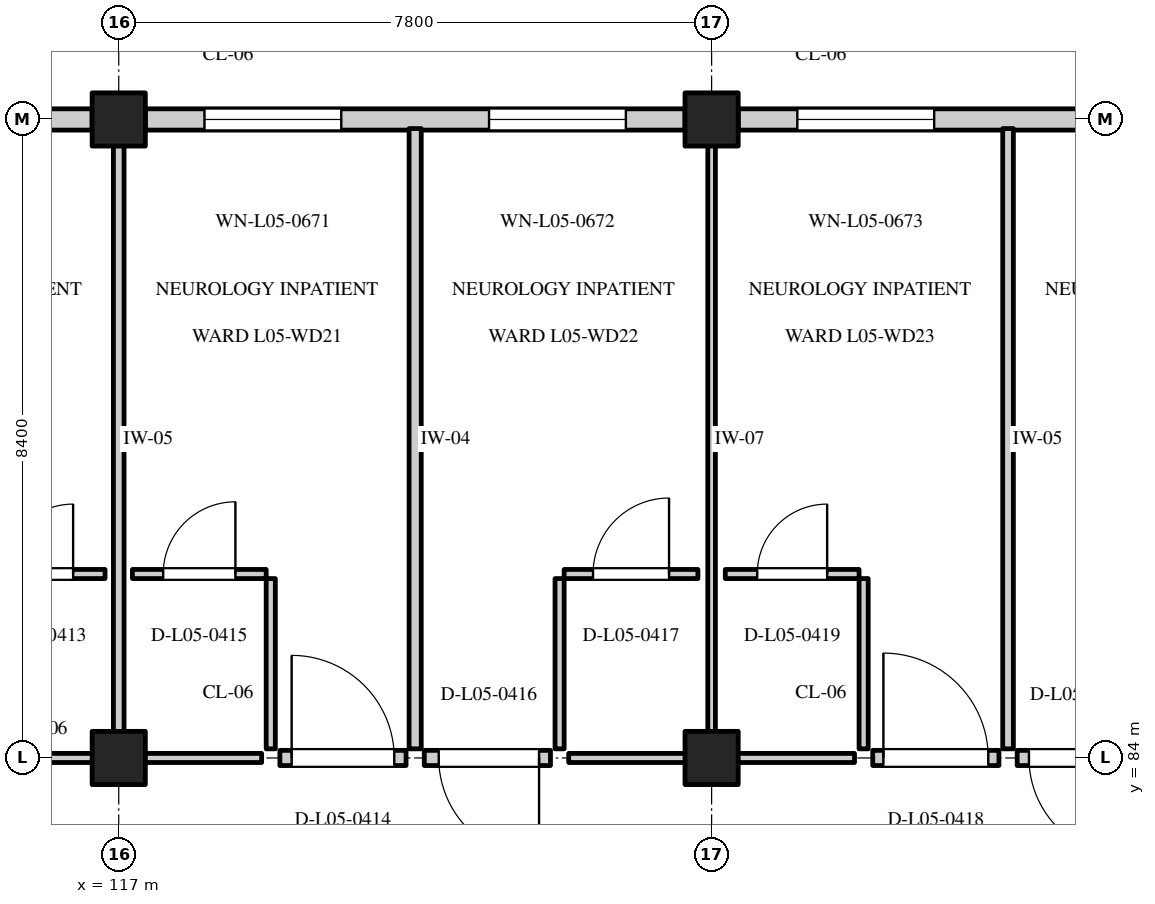
"""IFC4 building model, lengths in metres.
Left out: names, types, materials, properties, quantities, classifications, styles, units other than length and angle.
Written with IfcOpenShell. Run it as: python <this file> out.ifc"""

import sys

from ifc_helpers import new_model, si_unit, direction, frame, frame_2d, origin, origin_2d, place, context, subcontext, project, spatial, rectangle, extrude, element, fill, save


model = new_model("IFC4")
c1 = context("Model", 3, precision=1e-05, world=origin(), true_north=direction((0.0, 1.0)))
c2 = subcontext(c1, "Body", "Model", "MODEL_VIEW")
j1 = project(units=[si_unit("LENGTHUNIT", "METRE"), si_unit("PLANEANGLEUNIT", "RADIAN")], contexts=[c1])
p1 = place(None, origin())
s1 = spatial("IfcSite", under=j1, at=p1, CompositionType="ELEMENT")
p2 = place(p1, origin())
s2 = spatial("IfcBuilding", under=s1, at=p2, CompositionType="ELEMENT")
p3 = place(p2, frame((0.0, 0.0, 22.2)))
s3 = spatial("IfcBuildingStorey", under=s2, at=p3, CompositionType="ELEMENT", Elevation=22.2)
for number, where, z_axis, x_axis in (
    (1, (117.0, 84.0, 0.0), (0.0, 0.0, 1.0), (1.0, 0.0, 0.0)),
    (2, (117.0, 92.4, 0.0), (0.0, 0.0, 1.0), (1.0, 0.0, 0.0)),
    (3, (124.8, 84.0, 0.0), (0.0, 0.0, 1.0), (1.0, 0.0, 0.0)),
    (4, (124.8, 92.4, 0.0), (0.0, 0.0, 1.0), (1.0, 0.0, 0.0)),
):
    element("IfcColumn", number, at=place(p3, frame(where, z_axis=z_axis, x_axis=x_axis)), inside=s3, PredefinedType="COLUMN", context=c2, shape_type="SweptSolid", body=[
        extrude(rectangle(XDim=0.7, YDim=0.7, at=origin_2d()), origin(), (0.0, 0.0, 1.0), 3.9),
    ])
p4 = place(p3, frame((109.55, 92.4, 0.0), z_axis=(0.0, 0.0, 1.0), x_axis=(1.0, 0.0, 0.0)))
e5 = element("IfcWall", 5, at=p4, inside=s3, PredefinedType="STANDARD", context=c2, shape_type="SweptSolid", body=[
    extrude(rectangle(XDim=7.1, YDim=0.28, at=frame_2d((3.55, 0.0))), origin(), (0.0, 0.0, 1.0), 3.05),
])
p5 = place(p4, frame((0.678, 0.0, 0.8)))
e6 = element("IfcOpeningElement", 6, at=p5, cuts=e5, PredefinedType="OPENING", context=c2, shape_type="SweptSolid", body=[
    extrude(rectangle(XDim=2.0, YDim=1.45, at=frame_2d((1.0, 0.725))), frame((0.0, 0.152, 0.0), z_axis=(0.0, -1.0, 0.0), x_axis=(1.0, 0.0, 0.0)), (0.0, 0.0, 1.0), 0.304),
])
p6 = place(p4, frame((4.422, 0.0, 0.8)))
e7 = element("IfcOpeningElement", 7, at=p6, cuts=e5, PredefinedType="OPENING", context=c2, shape_type="SweptSolid", body=[
    extrude(rectangle(XDim=2.0, YDim=1.45, at=frame_2d((1.0, 0.725))), frame((0.0, 0.152, 0.0), z_axis=(0.0, -1.0, 0.0), x_axis=(1.0, 0.0, 0.0)), (0.0, 0.0, 1.0), 0.304),
])
p7 = place(p3, frame((117.35, 92.4, 0.0), z_axis=(0.0, 0.0, 1.0), x_axis=(1.0, 0.0, 0.0)))
e8 = element("IfcWall", 8, at=p7, inside=s3, PredefinedType="STANDARD", context=c2, shape_type="SweptSolid", body=[
    extrude(rectangle(XDim=7.1, YDim=0.28, at=frame_2d((3.55, 0.0))), origin(), (0.0, 0.0, 1.0), 3.05),
])
p8 = place(p7, frame((0.778, 0.0, 0.8)))
e9 = element("IfcOpeningElement", 9, at=p8, cuts=e8, PredefinedType="OPENING", context=c2, shape_type="SweptSolid", body=[
    extrude(rectangle(XDim=1.8, YDim=1.75, at=frame_2d((0.9, 0.875))), frame((0.0, 0.152, 0.0), z_axis=(0.0, -1.0, 0.0), x_axis=(1.0, 0.0, 0.0)), (0.0, 0.0, 1.0), 0.304),
])
p9 = place(p7, frame((4.522, 0.0, 0.8)))
e10 = element("IfcOpeningElement", 10, at=p9, cuts=e8, PredefinedType="OPENING", context=c2, shape_type="SweptSolid", body=[
    extrude(rectangle(XDim=1.8, YDim=1.75, at=frame_2d((0.9, 0.875))), frame((0.0, 0.152, 0.0), z_axis=(0.0, -1.0, 0.0), x_axis=(1.0, 0.0, 0.0)), (0.0, 0.0, 1.0), 0.304),
])
p10 = place(p3, frame((125.15, 92.4, 0.0), z_axis=(0.0, 0.0, 1.0), x_axis=(1.0, 0.0, 0.0)))
e11 = element("IfcWall", 11, at=p10, inside=s3, PredefinedType="STANDARD", context=c2, shape_type="SweptSolid", body=[
    extrude(rectangle(XDim=7.1, YDim=0.28, at=frame_2d((3.55, 0.0))), origin(), (0.0, 0.0, 1.0), 3.05),
])
p11 = place(p10, frame((0.778, 0.0, 0.8)))
e12 = element("IfcOpeningElement", 12, at=p11, cuts=e11, PredefinedType="OPENING", context=c2, shape_type="SweptSolid", body=[
    extrude(rectangle(XDim=1.8, YDim=1.65, at=frame_2d((0.9, 0.825))), frame((0.0, 0.152, 0.0), z_axis=(0.0, -1.0, 0.0), x_axis=(1.0, 0.0, 0.0)), (0.0, 0.0, 1.0), 0.304),
])
p12 = place(p10, frame((4.522, 0.0, 0.8)))
e13 = element("IfcOpeningElement", 13, at=p12, cuts=e11, PredefinedType="OPENING", context=c2, shape_type="SweptSolid", body=[
    extrude(rectangle(XDim=1.8, YDim=1.65, at=frame_2d((0.9, 0.825))), frame((0.0, 0.152, 0.0), z_axis=(0.0, -1.0, 0.0), x_axis=(1.0, 0.0, 0.0)), (0.0, 0.0, 1.0), 0.304),
])
p13 = place(p3, frame((117.0, 84.12, 0.0), z_axis=(0.0, 0.0, 1.0), x_axis=(0.0, 1.0, 0.0)))
e14 = element("IfcWall", 14, at=p13, inside=s3, PredefinedType="PARTITIONING", context=c2, shape_type="SweptSolid", body=[
    extrude(rectangle(XDim=8.16, YDim=0.14, at=frame_2d((4.08, 0.0))), origin(), (0.0, 0.0, 1.0), 2.95),
])
p14 = place(p3, frame((115.12, 84.0, 0.0), z_axis=(0.0, 0.0, 1.0), x_axis=(1.0, 0.0, 0.0)))
e15 = element("IfcWall", 15, at=p14, inside=s3, PredefinedType="PARTITIONING", context=c2, shape_type="SweptSolid", body=[
    extrude(rectangle(XDim=1.76, YDim=0.12, at=frame_2d((0.88, 0.0))), origin(), (0.0, 0.0, 1.0), 2.95),
])
p15 = place(p3, frame((115.06, 86.42, 0.0), z_axis=(0.0, 0.0, 1.0), x_axis=(1.0, 0.0, 0.0)))
e16 = element("IfcWall", 16, at=p15, inside=s3, PredefinedType="PARTITIONING", context=c2, shape_type="SweptSolid", body=[
    extrude(rectangle(XDim=1.76, YDim=0.12, at=frame_2d((0.88, 0.0))), origin(), (0.0, 0.0, 1.0), 3.58),
])
p16 = place(p15, frame((0.42, 0.0, 0.0)))
e17 = element("IfcOpeningElement", 17, at=p16, cuts=e16, PredefinedType="OPENING", context=c2, shape_type="SweptSolid", body=[
    extrude(rectangle(XDim=0.92, YDim=2.08, at=frame_2d((0.46, 1.04))), frame((0.0, 0.072, 0.0), z_axis=(0.0, -1.0, 0.0), x_axis=(1.0, 0.0, 0.0)), (0.0, 0.0, 1.0), 0.144),
])
p17 = place(p3, frame((120.9, 84.12, 0.0), z_axis=(0.0, 0.0, 1.0), x_axis=(0.0, 1.0, 0.0)))
e18 = element("IfcWall", 18, at=p17, inside=s3, PredefinedType="PARTITIONING", context=c2, shape_type="SweptSolid", body=[
    extrude(rectangle(XDim=8.16, YDim=0.16, at=frame_2d((4.08, 0.0))), origin(), (0.0, 0.0, 1.0), 3.58),
])
p18 = place(p3, frame((119.12, 84.0, 0.0), z_axis=(0.0, 0.0, 1.0), x_axis=(1.0, 0.0, 0.0)))
e19 = element("IfcWall", 19, at=p18, inside=s3, PredefinedType="STANDARD", context=c2, shape_type="SweptSolid", body=[
    extrude(rectangle(XDim=1.66, YDim=0.2, at=frame_2d((0.83, 0.0))), origin(), (0.0, 0.0, 1.0), 2.95),
])
p19 = place(p18, frame((0.155, 0.0, 0.0)))
e20 = element("IfcOpeningElement", 20, at=p19, cuts=e19, PredefinedType="OPENING", context=c2, shape_type="SweptSolid", body=[
    extrude(rectangle(XDim=1.35, YDim=2.15, at=frame_2d((0.675, 1.075))), frame((0.0, 0.112, 0.0), z_axis=(0.0, -1.0, 0.0), x_axis=(1.0, 0.0, 0.0)), (0.0, 0.0, 1.0), 0.224),
])
p20 = place(p3, frame((117.12, 84.0, 0.0), z_axis=(0.0, 0.0, 1.0), x_axis=(1.0, 0.0, 0.0)))
e21 = element("IfcWall", 21, at=p20, inside=s3, PredefinedType="PARTITIONING", context=c2, shape_type="SweptSolid", body=[
    extrude(rectangle(XDim=1.76, YDim=0.12, at=frame_2d((0.88, 0.0))), origin(), (0.0, 0.0, 1.0), 2.95),
])
p21 = place(p3, frame((119.0, 84.12, 0.0), z_axis=(0.0, 0.0, 1.0), x_axis=(0.0, 1.0, 0.0)))
e22 = element("IfcWall", 22, at=p21, inside=s3, PredefinedType="PARTITIONING", context=c2, shape_type="SweptSolid", body=[
    extrude(rectangle(XDim=2.24, YDim=0.12, at=frame_2d((1.12, 0.0))), origin(), (0.0, 0.0, 1.0), 3.58),
])
p22 = place(p3, frame((117.18, 86.42, 0.0), z_axis=(0.0, 0.0, 1.0), x_axis=(1.0, 0.0, 0.0)))
e23 = element("IfcWall", 23, at=p22, inside=s3, PredefinedType="PARTITIONING", context=c2, shape_type="SweptSolid", body=[
    extrude(rectangle(XDim=1.76, YDim=0.12, at=frame_2d((0.88, 0.0))), origin(), (0.0, 0.0, 1.0), 3.58),
])
p23 = place(p22, frame((0.405, 0.0, 0.0)))
e24 = element("IfcOpeningElement", 24, at=p23, cuts=e23, PredefinedType="OPENING", context=c2, shape_type="SweptSolid", body=[
    extrude(rectangle(XDim=0.95, YDim=2.1, at=frame_2d((0.475, 1.05))), frame((0.0, 0.072, 0.0), z_axis=(0.0, -1.0, 0.0), x_axis=(1.0, 0.0, 0.0)), (0.0, 0.0, 1.0), 0.144),
])
p24 = place(p3, frame((124.8, 84.12, 0.0), z_axis=(0.0, 0.0, 1.0), x_axis=(0.0, 1.0, 0.0)))
e25 = element("IfcWall", 25, at=p24, inside=s3, PredefinedType="PARTITIONING", context=c2, shape_type="SweptSolid", body=[
    extrude(rectangle(XDim=8.16, YDim=0.1, at=frame_2d((4.08, 0.0))), origin(), (0.0, 0.0, 1.0), 3.58),
])
p25 = place(p3, frame((121.02, 84.0, 0.0), z_axis=(0.0, 0.0, 1.0), x_axis=(1.0, 0.0, 0.0)))
e26 = element("IfcWall", 26, at=p25, inside=s3, PredefinedType="STANDARD", context=c2, shape_type="SweptSolid", body=[
    extrude(rectangle(XDim=1.66, YDim=0.2, at=frame_2d((0.83, 0.0))), origin(), (0.0, 0.0, 1.0), 2.95),
])
p26 = place(p25, frame((0.19, 0.0, 0.0)))
e27 = element("IfcOpeningElement", 27, at=p26, cuts=e26, PredefinedType="OPENING", context=c2, shape_type="SweptSolid", body=[
    extrude(rectangle(XDim=1.32, YDim=2.2, at=frame_2d((0.66, 1.1))), frame((0.0, 0.112, 0.0), z_axis=(0.0, -1.0, 0.0), x_axis=(1.0, 0.0, 0.0)), (0.0, 0.0, 1.0), 0.224),
])
p27 = place(p3, frame((122.92, 84.0, 0.0), z_axis=(0.0, 0.0, 1.0), x_axis=(1.0, 0.0, 0.0)))
e28 = element("IfcWall", 28, at=p27, inside=s3, PredefinedType="PARTITIONING", context=c2, shape_type="SweptSolid", body=[
    extrude(rectangle(XDim=1.76, YDim=0.12, at=frame_2d((0.88, 0.0))), origin(), (0.0, 0.0, 1.0), 2.95),
])
p28 = place(p3, frame((122.8, 84.12, 0.0), z_axis=(0.0, 0.0, 1.0), x_axis=(0.0, 1.0, 0.0)))
e29 = element("IfcWall", 29, at=p28, inside=s3, PredefinedType="PARTITIONING", context=c2, shape_type="SweptSolid", body=[
    extrude(rectangle(XDim=2.24, YDim=0.12, at=frame_2d((1.12, 0.0))), origin(), (0.0, 0.0, 1.0), 3.58),
])
p29 = place(p3, frame((122.86, 86.42, 0.0), z_axis=(0.0, 0.0, 1.0), x_axis=(1.0, 0.0, 0.0)))
e30 = element("IfcWall", 30, at=p29, inside=s3, PredefinedType="PARTITIONING", context=c2, shape_type="SweptSolid", body=[
    extrude(rectangle(XDim=1.76, YDim=0.12, at=frame_2d((0.88, 0.0))), origin(), (0.0, 0.0, 1.0), 3.58),
])
p30 = place(p29, frame((0.38, 0.0, 0.0)))
e31 = element("IfcOpeningElement", 31, at=p30, cuts=e30, PredefinedType="OPENING", context=c2, shape_type="SweptSolid", body=[
    extrude(rectangle(XDim=1.0, YDim=2.1, at=frame_2d((0.5, 1.05))), frame((0.0, 0.072, 0.0), z_axis=(0.0, -1.0, 0.0), x_axis=(1.0, 0.0, 0.0)), (0.0, 0.0, 1.0), 0.144),
])
p31 = place(p3, frame((128.7, 84.12, 0.0), z_axis=(0.0, 0.0, 1.0), x_axis=(0.0, 1.0, 0.0)))
e32 = element("IfcWall", 32, at=p31, inside=s3, PredefinedType="PARTITIONING", context=c2, shape_type="SweptSolid", body=[
    extrude(rectangle(XDim=8.16, YDim=0.14, at=frame_2d((4.08, 0.0))), origin(), (0.0, 0.0, 1.0), 3.58),
])
p32 = place(p3, frame((126.92, 84.0, 0.0), z_axis=(0.0, 0.0, 1.0), x_axis=(1.0, 0.0, 0.0)))
e33 = element("IfcWall", 33, at=p32, inside=s3, PredefinedType="STANDARD", context=c2, shape_type="SweptSolid", body=[
    extrude(rectangle(XDim=1.66, YDim=0.2, at=frame_2d((0.83, 0.0))), origin(), (0.0, 0.0, 1.0), 2.95),
])
p33 = place(p32, frame((0.14, 0.0, 0.0)))
e34 = element("IfcOpeningElement", 34, at=p33, cuts=e33, PredefinedType="OPENING", context=c2, shape_type="SweptSolid", body=[
    extrude(rectangle(XDim=1.38, YDim=2.2, at=frame_2d((0.69, 1.1))), frame((0.0, 0.112, 0.0), z_axis=(0.0, -1.0, 0.0), x_axis=(1.0, 0.0, 0.0)), (0.0, 0.0, 1.0), 0.224),
])
p34 = place(p3, frame((124.92, 84.0, 0.0), z_axis=(0.0, 0.0, 1.0), x_axis=(1.0, 0.0, 0.0)))
e35 = element("IfcWall", 35, at=p34, inside=s3, PredefinedType="PARTITIONING", context=c2, shape_type="SweptSolid", body=[
    extrude(rectangle(XDim=1.76, YDim=0.12, at=frame_2d((0.88, 0.0))), origin(), (0.0, 0.0, 1.0), 2.95),
])
p35 = place(p3, frame((126.8, 84.12, 0.0), z_axis=(0.0, 0.0, 1.0), x_axis=(0.0, 1.0, 0.0)))
e36 = element("IfcWall", 36, at=p35, inside=s3, PredefinedType="PARTITIONING", context=c2, shape_type="SweptSolid", body=[
    extrude(rectangle(XDim=2.24, YDim=0.12, at=frame_2d((1.12, 0.0))), origin(), (0.0, 0.0, 1.0), 3.58),
])
p36 = place(p3, frame((124.98, 86.42, 0.0), z_axis=(0.0, 0.0, 1.0), x_axis=(1.0, 0.0, 0.0)))
e37 = element("IfcWall", 37, at=p36, inside=s3, PredefinedType="PARTITIONING", context=c2, shape_type="SweptSolid", body=[
    extrude(rectangle(XDim=1.76, YDim=0.12, at=frame_2d((0.88, 0.0))), origin(), (0.0, 0.0, 1.0), 3.58),
])
p37 = place(p36, frame((0.42, 0.0, 0.0)))
e38 = element("IfcOpeningElement", 38, at=p37, cuts=e37, PredefinedType="OPENING", context=c2, shape_type="SweptSolid", body=[
    extrude(rectangle(XDim=0.92, YDim=2.08, at=frame_2d((0.46, 1.04))), frame((0.0, 0.072, 0.0), z_axis=(0.0, -1.0, 0.0), x_axis=(1.0, 0.0, 0.0)), (0.0, 0.0, 1.0), 0.144),
])
p38 = place(p3, frame((128.82, 84.0, 0.0), z_axis=(0.0, 0.0, 1.0), x_axis=(1.0, 0.0, 0.0)))
e39 = element("IfcWall", 39, at=p38, inside=s3, PredefinedType="STANDARD", context=c2, shape_type="SweptSolid", body=[
    extrude(rectangle(XDim=1.66, YDim=0.2, at=frame_2d((0.83, 0.0))), origin(), (0.0, 0.0, 1.0), 2.95),
])
p39 = place(p38, frame((0.155, 0.0, 0.0)))
e40 = element("IfcOpeningElement", 40, at=p39, cuts=e39, PredefinedType="OPENING", context=c2, shape_type="SweptSolid", body=[
    extrude(rectangle(XDim=1.3, YDim=2.15, at=frame_2d((0.65, 1.075))), frame((0.0, 0.112, 0.0), z_axis=(0.0, -1.0, 0.0), x_axis=(1.0, 0.0, 0.0)), (0.0, 0.0, 1.0), 0.224),
])
p40 = place(p8, origin())
e41 = element("IfcWindow", 41, at=p40, inside=s3, PartitioningType="DOUBLE_PANEL_VERTICAL", PredefinedType="WINDOW", context=c2, shape_type="SweptSolid", body=[
    extrude(rectangle(XDim=1.8, YDim=1.75, at=frame_2d((0.9, 0.875))), frame((0.0, 0.03, 0.0), z_axis=(0.0, -1.0, 0.0), x_axis=(1.0, 0.0, 0.0)), (0.0, 0.0, 1.0), 0.06),
])
fill(e9, e41)
p41 = place(p9, origin())
e42 = element("IfcWindow", 42, at=p41, inside=s3, PartitioningType="DOUBLE_PANEL_VERTICAL", PredefinedType="WINDOW", context=c2, shape_type="SweptSolid", body=[
    extrude(rectangle(XDim=1.8, YDim=1.75, at=frame_2d((0.9, 0.875))), frame((0.0, 0.03, 0.0), z_axis=(0.0, -1.0, 0.0), x_axis=(1.0, 0.0, 0.0)), (0.0, 0.0, 1.0), 0.06),
])
fill(e10, e42)
p42 = place(p11, origin())
e43 = element("IfcWindow", 43, at=p42, inside=s3, PartitioningType="DOUBLE_PANEL_VERTICAL", PredefinedType="WINDOW", context=c2, shape_type="SweptSolid", body=[
    extrude(rectangle(XDim=1.8, YDim=1.65, at=frame_2d((0.9, 0.825))), frame((0.0, 0.03, 0.0), z_axis=(0.0, -1.0, 0.0), x_axis=(1.0, 0.0, 0.0)), (0.0, 0.0, 1.0), 0.06),
])
fill(e12, e43)
p43 = place(p16, frame((0.92, 0.0, 0.0), z_axis=(0.0, 0.0, 1.0), x_axis=(-1.0, 0.0, 0.0)))
e44 = element("IfcDoor", 44, at=p43, inside=s3, OperationType="SINGLE_SWING_LEFT", PredefinedType="DOOR", context=c2, shape_type="SweptSolid", body=[
    extrude(rectangle(XDim=0.92, YDim=2.08, at=frame_2d((0.46, 1.04))), frame((0.0, 0.025, 0.0), z_axis=(0.0, -1.0, 0.0), x_axis=(1.0, 0.0, 0.0)), (0.0, 0.0, 1.0), 0.05),
])
fill(e17, e44)
p44 = place(p19, origin())
e45 = element("IfcDoor", 45, at=p44, inside=s3, OperationType="SINGLE_SWING_LEFT", PredefinedType="DOOR", context=c2, shape_type="SweptSolid", body=[
    extrude(rectangle(XDim=1.35, YDim=2.15, at=frame_2d((0.675, 1.075))), frame((0.0, 0.025, 0.0), z_axis=(0.0, -1.0, 0.0), x_axis=(1.0, 0.0, 0.0)), (0.0, 0.0, 1.0), 0.05),
])
fill(e20, e45)
p45 = place(p23, frame((0.95, 0.0, 0.0), z_axis=(0.0, 0.0, 1.0), x_axis=(-1.0, 0.0, 0.0)))
e46 = element("IfcDoor", 46, at=p45, inside=s3, OperationType="SINGLE_SWING_LEFT", PredefinedType="DOOR", context=c2, shape_type="SweptSolid", body=[
    extrude(rectangle(XDim=0.95, YDim=2.1, at=frame_2d((0.475, 1.05))), frame((0.0, 0.025, 0.0), z_axis=(0.0, -1.0, 0.0), x_axis=(1.0, 0.0, 0.0)), (0.0, 0.0, 1.0), 0.05),
])
fill(e24, e46)
p46 = place(p26, origin())
e47 = element("IfcDoor", 47, at=p46, inside=s3, OperationType="SINGLE_SWING_RIGHT", PredefinedType="DOOR", context=c2, shape_type="SweptSolid", body=[
    extrude(rectangle(XDim=1.32, YDim=2.2, at=frame_2d((0.66, 1.1))), frame((0.0, 0.025, 0.0), z_axis=(0.0, -1.0, 0.0), x_axis=(1.0, 0.0, 0.0)), (0.0, 0.0, 1.0), 0.05),
])
fill(e27, e47)
p47 = place(p30, frame((1.0, 0.0, 0.0), z_axis=(0.0, 0.0, 1.0), x_axis=(-1.0, 0.0, 0.0)))
e48 = element("IfcDoor", 48, at=p47, inside=s3, OperationType="SINGLE_SWING_LEFT", PredefinedType="DOOR", context=c2, shape_type="SweptSolid", body=[
    extrude(rectangle(XDim=1.0, YDim=2.1, at=frame_2d((0.5, 1.05))), frame((0.0, 0.025, 0.0), z_axis=(0.0, -1.0, 0.0), x_axis=(1.0, 0.0, 0.0)), (0.0, 0.0, 1.0), 0.05),
])
fill(e31, e48)
p48 = place(p33, origin())
e49 = element("IfcDoor", 49, at=p48, inside=s3, OperationType="SINGLE_SWING_LEFT", PredefinedType="DOOR", context=c2, shape_type="SweptSolid", body=[
    extrude(rectangle(XDim=1.38, YDim=2.2, at=frame_2d((0.69, 1.1))), frame((0.0, 0.025, 0.0), z_axis=(0.0, -1.0, 0.0), x_axis=(1.0, 0.0, 0.0)), (0.0, 0.0, 1.0), 0.05),
])
fill(e34, e49)
p49 = place(p37, frame((0.92, 0.0, 0.0), z_axis=(0.0, 0.0, 1.0), x_axis=(-1.0, 0.0, 0.0)))
e50 = element("IfcDoor", 50, at=p49, inside=s3, OperationType="SINGLE_SWING_LEFT", PredefinedType="DOOR", context=c2, shape_type="SweptSolid", body=[
    extrude(rectangle(XDim=0.92, YDim=2.08, at=frame_2d((0.46, 1.04))), frame((0.0, 0.025, 0.0), z_axis=(0.0, -1.0, 0.0), x_axis=(1.0, 0.0, 0.0)), (0.0, 0.0, 1.0), 0.05),
])
fill(e38, e50)
p50 = place(p39, origin())
e51 = element("IfcDoor", 51, at=p50, inside=s3, OperationType="SINGLE_SWING_RIGHT", PredefinedType="DOOR", context=c2, shape_type="SweptSolid", body=[
    extrude(rectangle(XDim=1.3, YDim=2.15, at=frame_2d((0.65, 1.075))), frame((0.0, 0.025, 0.0), z_axis=(0.0, -1.0, 0.0), x_axis=(1.0, 0.0, 0.0)), (0.0, 0.0, 1.0), 0.05),
])
fill(e40, e51)
save(model, sys.argv[1])
